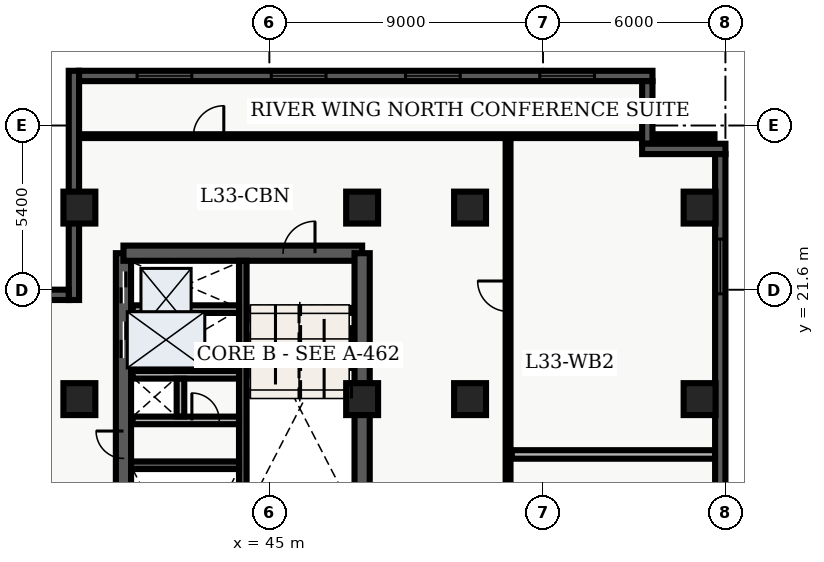
"""IFC4 building model, lengths in metres.
Left out: names, types, materials, properties, quantities, classifications, styles, units other than length and angle.
Written with IfcOpenShell. Run it as: python <this file> out.ifc"""

import sys

from ifc_helpers import new_model, entity, si_unit, converted_unit, direction, frame, origin_with_axes, origin_2d_with_axis, place, context, subcontext, project, spatial, polyline, rectangle, outline, extrude, element, fill, save


model = new_model("IFC4")
c1 = context("Model", 3, precision=1e-05, world=origin_with_axes(), true_north=direction((0.0, 1.0)))
c2 = subcontext(c1, "Body", "Model", "MODEL_VIEW")
j1 = project(units=[si_unit("LENGTHUNIT", "METRE"), converted_unit("PLANEANGLEUNIT", "DEGREE", entity("IfcPlaneAngleMeasure", 0.017), si_unit("PLANEANGLEUNIT", "RADIAN"), dimensions=[0, 0, 0, 0, 0, 0, 0])], contexts=[c1])
p1 = place(None, origin_with_axes())
s1 = spatial("IfcSite", under=j1, at=p1, CompositionType="ELEMENT")
p2 = place(p1, origin_with_axes())
s2 = spatial("IfcBuilding", under=s1, at=p2, CompositionType="ELEMENT")
p3 = place(p2, frame((0.0, 0.0, 136.8), z_axis=(0.0, 0.0, 1.0), x_axis=(1.0, 0.0, 0.0)))
s3 = spatial("IfcBuildingStorey", under=s2, at=p3, CompositionType="ELEMENT", Elevation=136.8)
p4 = place(p3, frame((40.2, 7.2, 0.0), z_axis=(0.0, 0.0, 1.0), x_axis=(0.0, 1.0, 0.0)))
e1 = element("IfcWall", 1, at=p4, inside=s3, PredefinedType="SHEAR", context=c2, shape_type="SweptSolid", body=[
    extrude(outline(polyline([(0.0, -0.25), (15.6, -0.25), (15.6, 0.25), (0.0, 0.25), (0.0, -0.25)])), origin_with_axes(), (0.0, 0.0, 1.0), 3.66),
])
p5 = place(p4, frame((14.475, 0.0, 0.0), z_axis=(0.0, 0.0, 1.0), x_axis=(1.0, 0.0, 0.0)))
e2 = element("IfcOpeningElement", 2, at=p5, cuts=e1, PredefinedType="OPENING", context=c2, shape_type="SweptSolid", body=[
    extrude(rectangle(XDim=1.05, YDim=0.52, at=origin_2d_with_axis()), origin_with_axes(), (0.0, 0.0, 1.0), 2.15),
])
p6 = place(p4, frame((12.75, 0.0, 0.0), z_axis=(0.0, 0.0, 1.0), x_axis=(1.0, 0.0, 0.0)))
e3 = element("IfcOpeningElement", 3, at=p6, cuts=e1, PredefinedType="OPENING", context=c2, shape_type="SweptSolid", body=[
    extrude(rectangle(XDim=1.2, YDim=0.52, at=origin_2d_with_axis()), origin_with_axes(), (0.0, 0.0, 1.0), 2.15),
])
p7 = place(p4, frame((9.3, 0.0, 0.0), z_axis=(0.0, 0.0, 1.0), x_axis=(1.0, 0.0, 0.0)))
e4 = element("IfcOpeningElement", 4, at=p7, cuts=e1, PredefinedType="OPENING", context=c2, shape_type="SweptSolid", body=[
    extrude(rectangle(XDim=0.9, YDim=0.52, at=origin_2d_with_axis()), origin_with_axes(), (0.0, 0.0, 1.0), 2.15),
])
p8 = place(p3, frame((40.2, 22.8, 0.0), z_axis=(0.0, 0.0, 1.0), x_axis=(1.0, 0.0, 0.0)))
e5 = element("IfcWall", 5, at=p8, inside=s3, PredefinedType="SHEAR", context=c2, shape_type="SweptSolid", body=[
    extrude(outline(polyline([(0.0, -0.25), (7.85, -0.25), (7.85, 0.25), (0.0, 0.25), (0.0, -0.25)])), origin_with_axes(), (0.0, 0.0, 1.0), 3.66),
])
p9 = place(p8, frame((5.775, 0.0, 0.0), z_axis=(0.0, 0.0, 1.0), x_axis=(1.0, 0.0, 0.0)))
e6 = element("IfcOpeningElement", 6, at=p9, cuts=e5, PredefinedType="OPENING", context=c2, shape_type="SweptSolid", body=[
    extrude(rectangle(XDim=1.05, YDim=0.52, at=origin_2d_with_axis()), origin_with_axes(), (0.0, 0.0, 1.0), 2.15),
])
p10 = place(p3, frame((48.05, 7.2, 0.0), z_axis=(0.0, 0.0, 1.0), x_axis=(0.0, 1.0, 0.0)))
e7 = element("IfcWall", 7, at=p10, inside=s3, PredefinedType="SHEAR", context=c2, shape_type="SweptSolid", body=[
    extrude(outline(polyline([(0.0, -0.25), (15.6, -0.25), (15.6, 0.25), (0.0, 0.25), (0.0, -0.25)])), origin_with_axes(), (0.0, 0.0, 1.0), 3.66),
])
p11 = place(p10, frame((5.975, 0.0, 0.0), z_axis=(0.0, 0.0, 1.0), x_axis=(1.0, 0.0, 0.0)))
e8 = element("IfcOpeningElement", 8, at=p11, cuts=e7, PredefinedType="OPENING", context=c2, shape_type="SweptSolid", body=[
    extrude(rectangle(XDim=1.05, YDim=0.52, at=origin_2d_with_axis()), origin_with_axes(), (0.0, 0.0, 1.0), 2.15),
])
p12 = place(p10, frame((2.725, 0.0, 0.0), z_axis=(0.0, 0.0, 1.0), x_axis=(1.0, 0.0, 0.0)))
e9 = element("IfcOpeningElement", 9, at=p12, cuts=e7, PredefinedType="OPENING", context=c2, shape_type="SweptSolid", body=[
    extrude(rectangle(XDim=0.95, YDim=0.52, at=origin_2d_with_axis()), origin_with_axes(), (0.0, 0.0, 1.0), 2.15),
])
p13 = place(p3, frame((44.125, 7.45, 0.0), z_axis=(0.0, 0.0, 1.0), x_axis=(0.0, 1.0, 0.0)))
e10 = element("IfcWall", 10, at=p13, inside=s3, PredefinedType="SHEAR", context=c2, shape_type="SweptSolid", body=[
    extrude(outline(polyline([(0.0, -0.125), (15.1, -0.125), (15.1, 0.125), (0.0, 0.125), (0.0, -0.125)])), origin_with_axes(), (0.0, 0.0, 1.0), 3.66),
])
p14 = place(p3, frame((40.45, 15.825, 0.0), z_axis=(0.0, 0.0, 1.0), x_axis=(1.0, 0.0, 0.0)))
e11 = element("IfcWall", 11, at=p14, inside=s3, PredefinedType="SHEAR", context=c2, shape_type="SweptSolid", body=[
    extrude(outline(polyline([(0.0, -0.125), (3.55, -0.125), (3.55, 0.125), (0.0, 0.125), (0.0, -0.125)])), origin_with_axes(), (0.0, 0.0, 1.0), 3.66),
])
p15 = place(p3, frame((40.5, 17.3, 0.0), z_axis=(0.0, 0.0, 1.0), x_axis=(1.0, 0.0, 0.0)))
e12 = element("IfcWall", 12, at=p15, inside=s3, PredefinedType="SOLIDWALL", context=c2, shape_type="SweptSolid", body=[
    extrude(outline(polyline([(0.0, -0.125), (3.5, -0.125), (3.5, 0.125), (0.0, 0.125), (0.0, -0.125)])), origin_with_axes(), (0.0, 0.0, 1.0), 2.7),
])
p16 = place(p15, frame((2.4, 0.0, 0.0), z_axis=(0.0, 0.0, 1.0), x_axis=(1.0, 0.0, 0.0)))
e13 = element("IfcOpeningElement", 13, at=p16, cuts=e12, PredefinedType="OPENING", context=c2, shape_type="SweptSolid", body=[
    extrude(rectangle(XDim=0.9, YDim=0.27, at=origin_2d_with_axis()), origin_with_axes(), (0.0, 0.0, 1.0), 2.15),
])
p17 = place(p3, frame((40.5, 18.8, 0.0), z_axis=(0.0, 0.0, 1.0), x_axis=(1.0, 0.0, 0.0)))
e14 = element("IfcWall", 14, at=p17, inside=s3, PredefinedType="SOLIDWALL", context=c2, shape_type="SweptSolid", body=[
    extrude(outline(polyline([(0.0, -0.125), (3.5, -0.125), (3.5, 0.125), (0.0, 0.125), (0.0, -0.125)])), origin_with_axes(), (0.0, 0.0, 1.0), 2.7),
])
p18 = place(p3, frame((42.075, 17.43, 0.0), z_axis=(0.0, 0.0, 1.0), x_axis=(0.0, 1.0, 0.0)))
e15 = element("IfcWall", 15, at=p18, inside=s3, PredefinedType="SOLIDWALL", context=c2, shape_type="SweptSolid", body=[
    extrude(outline(polyline([(0.0, -0.125), (1.24, -0.125), (1.24, 0.125), (0.0, 0.125), (0.0, -0.125)])), origin_with_axes(), (0.0, 0.0, 1.0), 2.7),
])
for number, where, z_axis, x_axis in (
    (16, (38.75, 18.0, 0.0), (0.0, 0.0, 1.0), (1.0, 0.0, 0.0)),
    (17, (38.75, 24.3, 0.0), (0.0, 0.0, 1.0), (1.0, 0.0, 0.0)),
    (18, (48.05, 18.0, 0.0), (0.0, 0.0, 1.0), (1.0, 0.0, 0.0)),
    (19, (48.05, 24.3, 0.0), (0.0, 0.0, 1.0), (1.0, 0.0, 0.0)),
    (20, (51.6, 18.0, 0.0), (0.0, 0.0, 1.0), (1.0, 0.0, 0.0)),
    (21, (51.6, 24.3, 0.0), (0.0, 0.0, 1.0), (1.0, 0.0, 0.0)),
    (22, (59.15, 18.0, 0.0), (0.0, 0.0, 1.0), (1.0, 0.0, 0.0)),
    (23, (59.15, 24.3, 0.0), (0.0, 0.0, 1.0), (1.0, 0.0, 0.0)),
):
    element("IfcColumn", number, at=place(p3, frame(where, z_axis=z_axis, x_axis=x_axis)), inside=s3, PredefinedType="COLUMN", context=c2, shape_type="SweptSolid", body=[
        extrude(rectangle(XDim=1.05, YDim=1.05, at=origin_2d_with_axis()), origin_with_axes(), (0.0, 0.0, 1.0), 3.9),
    ])
p19 = place(p3, frame((40.5, 20.96, 0.0), z_axis=(0.0, 0.0, 1.0), x_axis=(1.0, 0.0, 0.0)))
e24 = element("IfcWall", 24, at=p19, inside=s3, PredefinedType="SOLIDWALL", context=c2, shape_type="SweptSolid", body=[
    extrude(outline(polyline([(0.0, -0.125), (3.5, -0.125), (3.5, 0.125), (0.0, 0.125), (0.0, -0.125)])), origin_with_axes(), (0.0, 0.0, 1.0), 2.7),
])
p20 = place(p3, frame((52.85, 7.85, 0.0), z_axis=(0.0, 0.0, 1.0), x_axis=(0.0, 1.0, 0.0)))
e25 = element("IfcWall", 25, at=p20, inside=s3, PredefinedType="PARTITIONING", context=c2, shape_type="SweptSolid", body=[
    extrude(outline(polyline([(0.0, -0.08), (18.8, -0.08), (18.8, 0.08), (0.0, 0.08), (0.0, -0.08)])), origin_with_axes(), (0.0, 0.0, 1.0), 2.7),
])
p21 = place(p20, frame((4.195, 0.0, 0.0), z_axis=(0.0, 0.0, 1.0), x_axis=(1.0, 0.0, 0.0)))
e26 = element("IfcOpeningElement", 26, at=p21, cuts=e25, PredefinedType="OPENING", context=c2, shape_type="SweptSolid", body=[
    extrude(rectangle(XDim=1.0, YDim=0.18, at=origin_2d_with_axis()), origin_with_axes(), (0.0, 0.0, 1.0), 2.15),
])
p22 = place(p20, frame((13.535, 0.0, 0.0), z_axis=(0.0, 0.0, 1.0), x_axis=(1.0, 0.0, 0.0)))
e27 = element("IfcOpeningElement", 27, at=p22, cuts=e25, PredefinedType="OPENING", context=c2, shape_type="SweptSolid", body=[
    extrude(rectangle(XDim=1.0, YDim=0.18, at=origin_2d_with_axis()), origin_with_axes(), (0.0, 0.0, 1.0), 2.15),
])
p23 = place(p3, frame((38.735, 26.65, 0.0), z_axis=(0.0, 0.0, 1.0), x_axis=(1.0, 0.0, 0.0)))
e28 = element("IfcWall", 28, at=p23, inside=s3, PredefinedType="PARTITIONING", context=c2, shape_type="SweptSolid", body=[
    extrude(outline(polyline([(0.0, -0.062), (20.905, -0.062), (20.905, 0.062), (0.0, 0.062), (0.0, -0.062)])), origin_with_axes(), (0.0, 0.0, 1.0), 2.7),
])
p24 = place(p23, frame((4.265, 0.0, 0.0), z_axis=(0.0, 0.0, 1.0), x_axis=(1.0, 0.0, 0.0)))
e29 = element("IfcOpeningElement", 29, at=p24, cuts=e28, PredefinedType="OPENING", context=c2, shape_type="SweptSolid", body=[
    extrude(rectangle(XDim=1.0, YDim=0.145, at=origin_2d_with_axis()), origin_with_axes(), (0.0, 0.0, 1.0), 2.15),
])
p25 = place(p3, frame((52.97, 16.18, 0.0), z_axis=(0.0, 0.0, 1.0), x_axis=(1.0, 0.0, 0.0)))
e30 = element("IfcWall", 30, at=p25, inside=s3, PredefinedType="PARTITIONING", context=c2, shape_type="SweptSolid", body=[
    extrude(outline(polyline([(0.0, -0.14), (6.695, -0.14), (6.695, 0.14), (0.0, 0.14), (0.0, -0.14)])), origin_with_axes(), (0.0, 0.0, 1.0), 2.7),
])
p26 = place(p3, frame((38.57, 21.26, 0.0), z_axis=(0.0, 0.0, 1.0), x_axis=(0.0, 1.0, 0.0)))
e31 = element("IfcWall", 31, at=p26, inside=s3, PredefinedType="SOLIDWALL", context=c2, shape_type="SweptSolid", body=[
    extrude(outline(polyline([(0.0, -0.17), (7.54, -0.17), (7.54, 0.17), (0.0, 0.17), (0.0, -0.17)])), origin_with_axes(), (0.0, 0.0, 1.0), 3.66),
])
p27 = place(p3, frame((38.74, 28.63, 0.0), z_axis=(0.0, 0.0, 1.0), x_axis=(1.0, 0.0, 0.0)))
e32 = element("IfcWall", 32, at=p27, inside=s3, PredefinedType="SOLIDWALL", context=c2, shape_type="SweptSolid", body=[
    extrude(outline(polyline([(0.0, -0.17), (18.86, -0.17), (18.86, 0.17), (0.0, 0.17), (0.0, -0.17)])), origin_with_axes(), (0.0, 0.0, 1.0), 3.66),
])
p28 = place(p27, frame((2.808, 0.0, 0.45), z_axis=(0.0, 0.0, 1.0), x_axis=(1.0, 0.0, 0.0)))
e33 = element("IfcOpeningElement", 33, at=p28, cuts=e32, PredefinedType="OPENING", context=c2, shape_type="SweptSolid", body=[
    extrude(rectangle(XDim=1.8, YDim=0.36, at=origin_2d_with_axis()), origin_with_axes(), (0.0, 0.0, 1.0), 2.1),
])
p29 = place(p27, frame((7.222, 0.0, 0.45), z_axis=(0.0, 0.0, 1.0), x_axis=(1.0, 0.0, 0.0)))
e34 = element("IfcOpeningElement", 34, at=p29, cuts=e32, PredefinedType="OPENING", context=c2, shape_type="SweptSolid", body=[
    extrude(rectangle(XDim=1.8, YDim=0.36, at=origin_2d_with_axis()), origin_with_axes(), (0.0, 0.0, 1.0), 2.1),
])
p30 = place(p27, frame((11.637, 0.0, 0.45), z_axis=(0.0, 0.0, 1.0), x_axis=(1.0, 0.0, 0.0)))
e35 = element("IfcOpeningElement", 35, at=p30, cuts=e32, PredefinedType="OPENING", context=c2, shape_type="SweptSolid", body=[
    extrude(rectangle(XDim=1.8, YDim=0.36, at=origin_2d_with_axis()), origin_with_axes(), (0.0, 0.0, 1.0), 2.1),
])
p31 = place(p27, frame((16.053, 0.0, 0.45), z_axis=(0.0, 0.0, 1.0), x_axis=(1.0, 0.0, 0.0)))
e36 = element("IfcOpeningElement", 36, at=p31, cuts=e32, PredefinedType="OPENING", context=c2, shape_type="SweptSolid", body=[
    extrude(rectangle(XDim=1.8, YDim=0.36, at=origin_2d_with_axis()), origin_with_axes(), (0.0, 0.0, 1.0), 2.1),
])
p32 = place(p3, frame((57.43, 28.46, 0.0), z_axis=(0.0, 0.0, 1.0), x_axis=(0.0, -1.0, 0.0)))
e37 = element("IfcWall", 37, at=p32, inside=s3, PredefinedType="SOLIDWALL", context=c2, shape_type="SweptSolid", body=[
    extrude(outline(polyline([(0.0, -0.17), (2.06, -0.17), (2.06, 0.17), (0.0, 0.17), (0.0, -0.17)])), origin_with_axes(), (0.0, 0.0, 1.0), 3.66),
])
p33 = place(p3, frame((57.26, 26.23, 0.0), z_axis=(0.0, 0.0, 1.0), x_axis=(1.0, 0.0, 0.0)))
e38 = element("IfcWall", 38, at=p33, inside=s3, PredefinedType="SOLIDWALL", context=c2, shape_type="SweptSolid", body=[
    extrude(outline(polyline([(0.0, -0.17), (2.74, -0.17), (2.74, 0.17), (0.0, 0.17), (0.0, -0.17)])), origin_with_axes(), (0.0, 0.0, 1.0), 3.66),
])
p34 = place(p3, frame((59.83, 26.06, 0.0), z_axis=(0.0, 0.0, 1.0), x_axis=(0.0, -1.0, 0.0)))
e39 = element("IfcWall", 39, at=p34, inside=s3, PredefinedType="SOLIDWALL", context=c2, shape_type="SweptSolid", body=[
    extrude(outline(polyline([(0.0, -0.17), (23.66, -0.17), (23.66, 0.17), (0.0, 0.17), (0.0, -0.17)])), origin_with_axes(), (0.0, 0.0, 1.0), 3.66),
])
p35 = place(p34, frame((3.696, 0.0, 0.45), z_axis=(0.0, 0.0, 1.0), x_axis=(1.0, 0.0, 0.0)))
e40 = element("IfcOpeningElement", 40, at=p35, cuts=e39, PredefinedType="OPENING", context=c2, shape_type="SweptSolid", body=[
    extrude(rectangle(XDim=1.8, YDim=0.36, at=origin_2d_with_axis()), origin_with_axes(), (0.0, 0.0, 1.0), 2.1),
])
p36 = place(p34, frame((11.83, 0.0, 0.45), z_axis=(0.0, 0.0, 1.0), x_axis=(1.0, 0.0, 0.0)))
e41 = element("IfcOpeningElement", 41, at=p36, cuts=e39, PredefinedType="OPENING", context=c2, shape_type="SweptSolid", body=[
    extrude(rectangle(XDim=1.8, YDim=0.36, at=origin_2d_with_axis()), origin_with_axes(), (0.0, 0.0, 1.0), 2.1),
])
p37 = place(p34, frame((20.364, 0.0, 0.45), z_axis=(0.0, 0.0, 1.0), x_axis=(1.0, 0.0, 0.0)))
e42 = element("IfcOpeningElement", 42, at=p37, cuts=e39, PredefinedType="OPENING", context=c2, shape_type="SweptSolid", body=[
    extrude(rectangle(XDim=1.8, YDim=0.36, at=origin_2d_with_axis()), origin_with_axes(), (0.0, 0.0, 1.0), 2.1),
])
p38 = place(p3, frame((21.485, 21.43, 0.0), z_axis=(0.0, 0.0, 1.0), x_axis=(1.0, 0.0, 0.0)))
e43 = element("IfcWall", 43, at=p38, inside=s3, PredefinedType="SOLIDWALL", context=c2, shape_type="SweptSolid", body=[
    extrude(outline(polyline([(0.0, -0.17), (16.915, -0.17), (16.915, 0.17), (0.0, 0.17), (0.0, -0.17)])), origin_with_axes(), (0.0, 0.0, 1.0), 3.66),
])
p39 = place(p38, frame((3.219, 0.0, 0.45), z_axis=(0.0, 0.0, 1.0), x_axis=(1.0, 0.0, 0.0)))
e44 = element("IfcOpeningElement", 44, at=p39, cuts=e43, PredefinedType="OPENING", context=c2, shape_type="SweptSolid", body=[
    extrude(rectangle(XDim=1.8, YDim=0.36, at=origin_2d_with_axis()), origin_with_axes(), (0.0, 0.0, 1.0), 2.1),
])
p40 = place(p38, frame((8.457, 0.0, 0.45), z_axis=(0.0, 0.0, 1.0), x_axis=(1.0, 0.0, 0.0)))
e45 = element("IfcOpeningElement", 45, at=p40, cuts=e43, PredefinedType="OPENING", context=c2, shape_type="SweptSolid", body=[
    extrude(rectangle(XDim=1.8, YDim=0.36, at=origin_2d_with_axis()), origin_with_axes(), (0.0, 0.0, 1.0), 2.1),
])
p41 = place(p38, frame((13.246, 0.0, 0.45), z_axis=(0.0, 0.0, 1.0), x_axis=(1.0, 0.0, 0.0)))
e46 = element("IfcOpeningElement", 46, at=p41, cuts=e43, PredefinedType="OPENING", context=c2, shape_type="SweptSolid", body=[
    extrude(rectangle(XDim=1.8, YDim=0.36, at=origin_2d_with_axis()), origin_with_axes(), (0.0, 0.0, 1.0), 2.1),
])
p42 = place(p4, frame((14.475, 0.0, 0.0), z_axis=(0.0, 0.0, 1.0), x_axis=(1.0, 0.0, 0.0)))
e47 = element("IfcDoor", 47, at=p42, inside=s3, OperationType="SLIDING_TO_RIGHT", PredefinedType="DOOR", context=c2, shape_type="SweptSolid", body=[
    extrude(rectangle(XDim=1.05, YDim=0.09, at=origin_2d_with_axis()), origin_with_axes(), (0.0, 0.0, 1.0), 2.15),
])
fill(e2, e47)
p43 = place(p4, frame((12.75, 0.0, 0.0), z_axis=(0.0, 0.0, 1.0), x_axis=(1.0, 0.0, 0.0)))
e48 = element("IfcDoor", 48, at=p43, inside=s3, OperationType="DOUBLE_DOOR_SLIDING", PredefinedType="DOOR", context=c2, shape_type="SweptSolid", body=[
    extrude(rectangle(XDim=1.2, YDim=0.09, at=origin_2d_with_axis()), origin_with_axes(), (0.0, 0.0, 1.0), 2.15),
])
fill(e3, e48)
p44 = place(p4, frame((9.3, 0.0, 0.0), z_axis=(0.0, 0.0, 1.0), x_axis=(1.0, 0.0, 0.0)))
e49 = element("IfcDoor", 49, at=p44, inside=s3, OperationType="SINGLE_SWING_RIGHT", PredefinedType="DOOR", context=c2, shape_type="SweptSolid", body=[
    extrude(rectangle(XDim=0.9, YDim=0.09, at=origin_2d_with_axis()), origin_with_axes(), (0.0, 0.0, 1.0), 2.15),
])
fill(e4, e49)
p45 = place(p15, frame((2.4, 0.0, 0.0), z_axis=(0.0, 0.0, 1.0), x_axis=(1.0, 0.0, 0.0)))
e50 = element("IfcDoor", 50, at=p45, inside=s3, OperationType="SINGLE_SWING_LEFT", PredefinedType="DOOR", context=c2, shape_type="SweptSolid", body=[
    extrude(rectangle(XDim=0.9, YDim=0.09, at=origin_2d_with_axis()), origin_with_axes(), (0.0, 0.0, 1.0), 2.15),
])
fill(e13, e50)
p46 = place(p8, frame((5.775, 0.0, 0.0), z_axis=(0.0, 0.0, 1.0), x_axis=(1.0, 0.0, 0.0)))
e51 = element("IfcDoor", 51, at=p46, inside=s3, OperationType="SINGLE_SWING_RIGHT", PredefinedType="DOOR", context=c2, shape_type="SweptSolid", body=[
    extrude(rectangle(XDim=1.05, YDim=0.09, at=origin_2d_with_axis()), origin_with_axes(), (0.0, 0.0, 1.0), 2.15),
])
fill(e6, e51)
p47 = place(p23, frame((4.265, 0.0, 0.0), z_axis=(0.0, 0.0, 1.0), x_axis=(1.0, 0.0, 0.0)))
e52 = element("IfcDoor", 52, at=p47, inside=s3, OperationType="SINGLE_SWING_RIGHT", PredefinedType="DOOR", context=c2, shape_type="SweptSolid", body=[
    extrude(rectangle(XDim=1.0, YDim=0.075, at=origin_2d_with_axis()), origin_with_axes(), (0.0, 0.0, 1.0), 2.15),
])
fill(e29, e52)
p48 = place(p20, frame((13.535, 0.0, 0.0), z_axis=(0.0, 0.0, 1.0), x_axis=(1.0, 0.0, 0.0)))
e53 = element("IfcDoor", 53, at=p48, inside=s3, OperationType="SINGLE_SWING_RIGHT", PredefinedType="DOOR", context=c2, shape_type="SweptSolid", body=[
    extrude(rectangle(XDim=1.0, YDim=0.09, at=origin_2d_with_axis()), origin_with_axes(), (0.0, 0.0, 1.0), 2.15),
])
fill(e27, e53)
p49 = place(p27, frame((2.808, 0.0, 0.45), z_axis=(0.0, 0.0, 1.0), x_axis=(1.0, 0.0, 0.0)))
e54 = element("IfcWindow", 54, at=p49, inside=s3, PredefinedType="WINDOW", context=c2, shape_type="SweptSolid", body=[
    extrude(rectangle(XDim=1.8, YDim=0.09, at=origin_2d_with_axis()), origin_with_axes(), (0.0, 0.0, 1.0), 2.1),
])
fill(e33, e54)
p50 = place(p27, frame((7.222, 0.0, 0.45), z_axis=(0.0, 0.0, 1.0), x_axis=(1.0, 0.0, 0.0)))
e55 = element("IfcWindow", 55, at=p50, inside=s3, PredefinedType="WINDOW", context=c2, shape_type="SweptSolid", body=[
    extrude(rectangle(XDim=1.8, YDim=0.09, at=origin_2d_with_axis()), origin_with_axes(), (0.0, 0.0, 1.0), 2.1),
])
fill(e34, e55)
p51 = place(p27, frame((11.637, 0.0, 0.45), z_axis=(0.0, 0.0, 1.0), x_axis=(1.0, 0.0, 0.0)))
e56 = element("IfcWindow", 56, at=p51, inside=s3, PredefinedType="WINDOW", context=c2, shape_type="SweptSolid", body=[
    extrude(rectangle(XDim=1.8, YDim=0.09, at=origin_2d_with_axis()), origin_with_axes(), (0.0, 0.0, 1.0), 2.1),
])
fill(e35, e56)
p52 = place(p27, frame((16.053, 0.0, 0.45), z_axis=(0.0, 0.0, 1.0), x_axis=(1.0, 0.0, 0.0)))
e57 = element("IfcWindow", 57, at=p52, inside=s3, PredefinedType="WINDOW", context=c2, shape_type="SweptSolid", body=[
    extrude(rectangle(XDim=1.8, YDim=0.09, at=origin_2d_with_axis()), origin_with_axes(), (0.0, 0.0, 1.0), 2.1),
])
fill(e36, e57)
p53 = place(p34, frame((3.696, 0.0, 0.45), z_axis=(0.0, 0.0, 1.0), x_axis=(1.0, 0.0, 0.0)))
e58 = element("IfcWindow", 58, at=p53, inside=s3, PredefinedType="WINDOW", context=c2, shape_type="SweptSolid", body=[
    extrude(rectangle(XDim=1.8, YDim=0.09, at=origin_2d_with_axis()), origin_with_axes(), (0.0, 0.0, 1.0), 2.1),
])
fill(e40, e58)
save(model, sys.argv[1])
